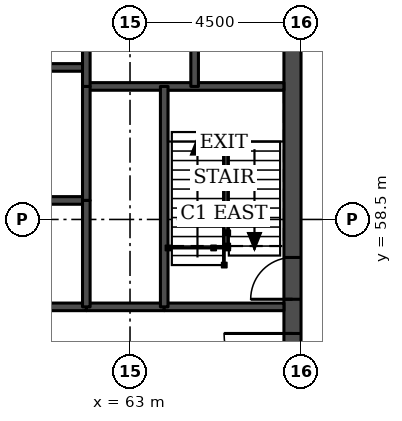
"""IFC4 building model, lengths in metres.
Left out: names, types, materials, properties, quantities, classifications, styles, units other than length and angle.
Written with IfcOpenShell. Run it as: python <this file> out.ifc"""

import sys

from ifc_helpers import new_model, si_unit, direction, frame, frame_2d, origin, place, context, subcontext, project, spatial, rectangle, extrude, element, fill, save


model = new_model("IFC4")
c1 = context("Model", 3, precision=1e-05, world=origin(), true_north=direction((0.0, 1.0)))
c2 = subcontext(c1, "Body", "Model", "MODEL_VIEW")
j1 = project(units=[si_unit("LENGTHUNIT", "METRE"), si_unit("PLANEANGLEUNIT", "RADIAN")], contexts=[c1])
p1 = place(None, origin())
s1 = spatial("IfcSite", under=j1, at=p1, CompositionType="ELEMENT")
p2 = place(p1, origin())
s2 = spatial("IfcBuilding", under=s1, at=p2, CompositionType="ELEMENT")
p3 = place(p2, frame((0.0, 0.0, 127.0)))
s3 = spatial("IfcBuildingStorey", under=s2, at=p3, CompositionType="ELEMENT", Elevation=127.0)
p4 = place(p3, frame((67.275, 49.5, 0.0), z_axis=(0.0, 0.0, 1.0), x_axis=(0.0, 1.0, 0.0)))
e1 = element("IfcWall", 1, at=p4, inside=s3, PredefinedType="SHEAR", context=c2, shape_type="SweptSolid", body=[
    extrude(rectangle(XDim=22.5, YDim=0.45, at=frame_2d((11.25, 0.0))), origin(), (0.0, 0.0, 1.0), 3.7),
])
p5 = place(p4, frame((4.2, 0.0, 0.0)))
e2 = element("IfcOpeningElement", 2, at=p5, cuts=e1, PredefinedType="OPENING", context=c2, shape_type="SweptSolid", body=[
    extrude(rectangle(XDim=1.8, YDim=2.1, at=frame_2d((0.9, 1.05))), frame((0.0, 0.235, 0.0), z_axis=(0.0, -1.0, 0.0), x_axis=(1.0, 0.0, 0.0)), (0.0, 0.0, 1.0), 0.47),
])
p6 = place(p4, frame((6.9, 0.0, 0.0)))
e3 = element("IfcOpeningElement", 3, at=p6, cuts=e1, PredefinedType="OPENING", context=c2, shape_type="SweptSolid", body=[
    extrude(rectangle(XDim=1.1, YDim=2.1, at=frame_2d((0.55, 1.05))), frame((0.0, 0.235, 0.0), z_axis=(0.0, -1.0, 0.0), x_axis=(1.0, 0.0, 0.0)), (0.0, 0.0, 1.0), 0.47),
])
p7 = place(p4, frame((13.6, 0.0, 0.0)))
e4 = element("IfcOpeningElement", 4, at=p7, cuts=e1, PredefinedType="OPENING", context=c2, shape_type="SweptSolid", body=[
    extrude(rectangle(XDim=1.1, YDim=2.1, at=frame_2d((0.55, 1.05))), frame((0.0, 0.235, 0.0), z_axis=(0.0, -1.0, 0.0), x_axis=(1.0, 0.0, 0.0)), (0.0, 0.0, 1.0), 0.47),
])
p8 = place(p4, frame((16.5, 0.0, 0.0)))
e5 = element("IfcOpeningElement", 5, at=p8, cuts=e1, PredefinedType="OPENING", context=c2, shape_type="SweptSolid", body=[
    extrude(rectangle(XDim=1.8, YDim=2.1, at=frame_2d((0.9, 1.05))), frame((0.0, 0.235, 0.0), z_axis=(0.0, -1.0, 0.0), x_axis=(1.0, 0.0, 0.0)), (0.0, 0.0, 1.0), 0.47),
])
p9 = place(p3, frame((61.85, 56.2, 0.0), z_axis=(0.0, 0.0, 1.0), x_axis=(1.0, 0.0, 0.0)))
e6 = element("IfcWall", 6, at=p9, inside=s3, PredefinedType="SOLIDWALL", context=c2, shape_type="SweptSolid", body=[
    extrude(rectangle(XDim=2.05, YDim=0.2, at=frame_2d((1.025, 0.0))), origin(), (0.0, 0.0, 1.0), 3.55),
])
p10 = place(p3, frame((50.65, 56.2, 0.0), z_axis=(0.0, 0.0, 1.0), x_axis=(1.0, 0.0, 0.0)))
e7 = element("IfcWall", 7, at=p10, inside=s3, PredefinedType="SOLIDWALL", context=c2, shape_type="SweptSolid", body=[
    extrude(rectangle(XDim=11.2, YDim=0.2, at=frame_2d((5.6, 0.0))), origin(), (0.0, 0.0, 1.0), 3.55),
])
p11 = place(p3, frame((63.9, 56.2, 0.0), z_axis=(0.0, 0.0, 1.0), x_axis=(1.0, 0.0, 0.0)))
e8 = element("IfcWall", 8, at=p11, inside=s3, PredefinedType="SOLIDWALL", context=c2, shape_type="SweptSolid", body=[
    extrude(rectangle(XDim=3.15, YDim=0.2, at=frame_2d((1.575, 0.0))), origin(), (0.0, 0.0, 1.0), 3.55),
])
p12 = place(p3, frame((50.65, 59.0, 0.0), z_axis=(0.0, 0.0, 1.0), x_axis=(1.0, 0.0, 0.0)))
e9 = element("IfcWall", 9, at=p12, inside=s3, PredefinedType="SOLIDWALL", context=c2, shape_type="SweptSolid", body=[
    extrude(rectangle(XDim=11.2, YDim=0.2, at=frame_2d((5.6, 0.0))), origin(), (0.0, 0.0, 1.0), 3.7),
])
p13 = place(p3, frame((61.85, 62.0, 0.0), z_axis=(0.0, 0.0, 1.0), x_axis=(1.0, 0.0, 0.0)))
e10 = element("IfcWall", 10, at=p13, inside=s3, PredefinedType="SOLIDWALL", context=c2, shape_type="SweptSolid", body=[
    extrude(rectangle(XDim=5.2, YDim=0.2, at=frame_2d((2.6, 0.0))), origin(), (0.0, 0.0, 1.0), 3.55),
])
p14 = place(p3, frame((50.65, 62.5, 0.0), z_axis=(0.0, 0.0, 1.0), x_axis=(1.0, 0.0, 0.0)))
e11 = element("IfcWall", 11, at=p14, inside=s3, PredefinedType="SOLIDWALL", context=c2, shape_type="SweptSolid", body=[
    extrude(rectangle(XDim=11.2, YDim=0.2, at=frame_2d((5.6, 0.0))), origin(), (0.0, 0.0, 1.0), 3.7),
])
p15 = place(p3, frame((61.85, 59.0, 0.0), z_axis=(0.0, 0.0, 1.0), x_axis=(0.0, 1.0, 0.0)))
e12 = element("IfcWall", 12, at=p15, inside=s3, PredefinedType="SOLIDWALL", context=c2, shape_type="SweptSolid", body=[
    extrude(rectangle(XDim=3.0, YDim=0.2, at=frame_2d((1.5, 0.0))), origin(), (0.0, 0.0, 1.0), 3.7),
])
p16 = place(p3, frame((61.85, 56.2, 0.0), z_axis=(0.0, 0.0, 1.0), x_axis=(0.0, 1.0, 0.0)))
e13 = element("IfcWall", 13, at=p16, inside=s3, PredefinedType="SOLIDWALL", context=c2, shape_type="SweptSolid", body=[
    extrude(rectangle(XDim=2.8, YDim=0.2, at=frame_2d((1.4, 0.0))), origin(), (0.0, 0.0, 1.0), 3.55),
])
p17 = place(p3, frame((61.85, 62.0, 0.0), z_axis=(0.0, 0.0, 1.0), x_axis=(0.0, 1.0, 0.0)))
e14 = element("IfcWall", 14, at=p17, inside=s3, PredefinedType="SOLIDWALL", context=c2, shape_type="SweptSolid", body=[
    extrude(rectangle(XDim=3.3, YDim=0.2, at=frame_2d((1.65, 0.0))), origin(), (0.0, 0.0, 1.0), 3.55),
])
p18 = place(p3, frame((63.9, 56.2, 0.0), z_axis=(0.0, 0.0, 1.0), x_axis=(0.0, 1.0, 0.0)))
e15 = element("IfcWall", 15, at=p18, inside=s3, PredefinedType="SOLIDWALL", context=c2, shape_type="SweptSolid", body=[
    extrude(rectangle(XDim=5.8, YDim=0.2, at=frame_2d((2.9, 0.0))), origin(), (0.0, 0.0, 1.0), 3.55),
])
p19 = place(p3, frame((64.7, 62.0, 0.0), z_axis=(0.0, 0.0, 1.0), x_axis=(0.0, 1.0, 0.0)))
e16 = element("IfcWall", 16, at=p19, inside=s3, PredefinedType="SOLIDWALL", context=c2, shape_type="SweptSolid", body=[
    extrude(rectangle(XDim=3.3, YDim=0.2, at=frame_2d((1.65, 0.0))), origin(), (0.0, 0.0, 1.0), 3.55),
])
p20 = place(p19, frame((1.1, 0.0, 0.0)))
e17 = element("IfcOpeningElement", 17, at=p20, cuts=e16, PredefinedType="OPENING", context=c2, shape_type="SweptSolid", body=[
    extrude(rectangle(XDim=1.1, YDim=2.1, at=frame_2d((0.55, 1.05))), frame((0.0, 0.11, 0.0), z_axis=(0.0, -1.0, 0.0), x_axis=(1.0, 0.0, 0.0)), (0.0, 0.0, 1.0), 0.22),
])
p21 = place(p5, origin())
e18 = element("IfcDoor", 18, at=p21, inside=s3, OperationType="SINGLE_SWING_RIGHT", PredefinedType="DOOR", context=c2, shape_type="SweptSolid", body=[
    extrude(rectangle(XDim=1.8, YDim=2.1, at=frame_2d((0.9, 1.05))), frame((0.0, 0.025, 0.0), z_axis=(0.0, -1.0, 0.0), x_axis=(1.0, 0.0, 0.0)), (0.0, 0.0, 1.0), 0.05),
])
fill(e2, e18)
p22 = place(p6, origin())
e19 = element("IfcDoor", 19, at=p22, inside=s3, OperationType="SINGLE_SWING_LEFT", PredefinedType="DOOR", context=c2, shape_type="SweptSolid", body=[
    extrude(rectangle(XDim=1.1, YDim=2.1, at=frame_2d((0.55, 1.05))), frame((0.0, 0.025, 0.0), z_axis=(0.0, -1.0, 0.0), x_axis=(1.0, 0.0, 0.0)), (0.0, 0.0, 1.0), 0.05),
])
fill(e3, e19)
save(model, sys.argv[1])
